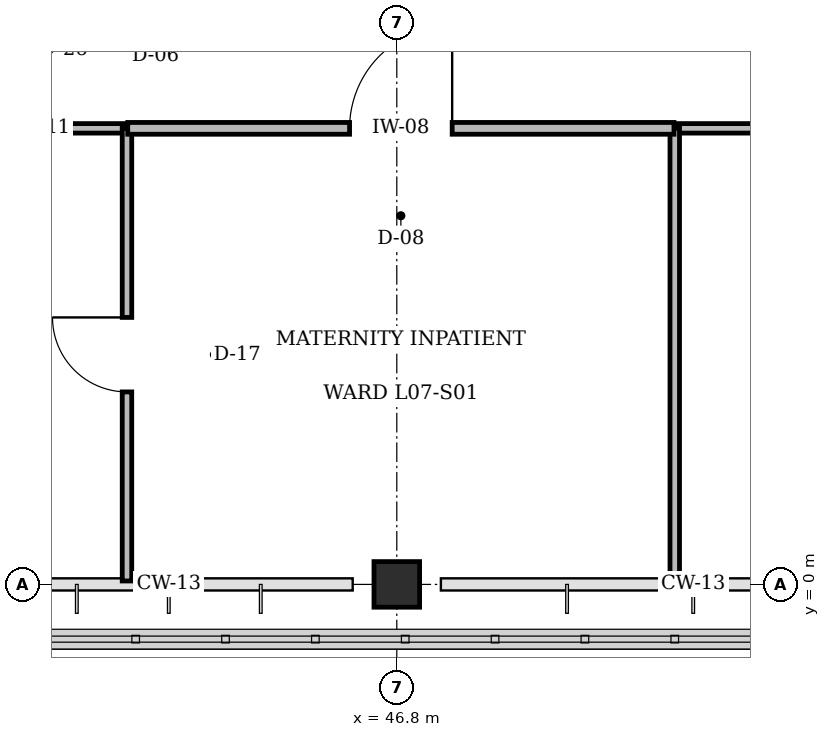
"""IFC4 building model, lengths in metres.
Left out: names, types, materials, properties, quantities, classifications, styles, units other than length and angle.
Written with IfcOpenShell. Run it as: python <this file> out.ifc"""

import sys

from ifc_helpers import new_model, si_unit, direction, frame, frame_2d, origin, origin_2d, place, context, subcontext, project, spatial, rectangle, extrude, element, fill, save


model = new_model("IFC4")
c1 = context("Model", 3, precision=1e-05, world=origin(), true_north=direction((0.0, 1.0)))
c2 = subcontext(c1, "Body", "Model", "MODEL_VIEW")
j1 = project(units=[si_unit("LENGTHUNIT", "METRE"), si_unit("PLANEANGLEUNIT", "RADIAN")], contexts=[c1])
p1 = place(None, origin())
s1 = spatial("IfcSite", under=j1, at=p1, CompositionType="ELEMENT")
p2 = place(p1, origin())
s2 = spatial("IfcBuilding", under=s1, at=p2, CompositionType="ELEMENT")
p3 = place(p2, frame((0.0, 0.0, 30.6)))
s3 = spatial("IfcBuildingStorey", under=s2, at=p3, CompositionType="ELEMENT", Elevation=30.6)
p4 = place(p3, frame((46.8, 0.0, 0.0), z_axis=(0.0, 0.0, 1.0), x_axis=(1.0, 0.0, 0.0)))
e1 = element("IfcColumn", 1, at=p4, inside=s3, PredefinedType="COLUMN", context=c2, shape_type="SweptSolid", body=[
    extrude(rectangle(XDim=0.6, YDim=0.6, at=origin_2d()), origin(), (0.0, 0.0, 1.0), 4.2),
])
p5 = place(p3, frame((41.0, 6.0, 0.0), z_axis=(0.0, 0.0, 1.0), x_axis=(1.0, 0.0, 0.0)))
e2 = element("IfcWall", 2, at=p5, inside=s3, PredefinedType="PARTITIONING", context=c2, shape_type="SweptSolid", body=[
    extrude(rectangle(XDim=2.25, YDim=0.125, at=frame_2d((1.125, 0.0))), origin(), (0.0, 0.0, 1.0), 3.9),
])
p6 = place(p3, frame((43.25, 0.045, 0.0), z_axis=(0.0, 0.0, 1.0), x_axis=(0.0, 1.0, 0.0)))
e3 = element("IfcWall", 3, at=p6, inside=s3, PredefinedType="PARTITIONING", context=c2, shape_type="SweptSolid", body=[
    extrude(rectangle(XDim=5.955, YDim=0.125, at=frame_2d((2.978, 0.0))), origin(), (0.0, 0.0, 1.0), 3.9),
])
p7 = place(p6, frame((2.488, 0.0, 0.0)))
e4 = element("IfcOpeningElement", 4, at=p7, cuts=e3, PredefinedType="OPENING", context=c2, shape_type="SweptSolid", body=[
    extrude(rectangle(XDim=0.98, YDim=2.1, at=frame_2d((0.49, 1.05))), frame((0.0, 0.073, 0.0), z_axis=(0.0, -1.0, 0.0), x_axis=(1.0, 0.0, 0.0)), (0.0, 0.0, 1.0), 0.145),
])
p8 = place(p3, frame((50.457, 6.0, 0.0), z_axis=(0.0, 0.0, 1.0), x_axis=(1.0, 0.0, 0.0)))
e5 = element("IfcWall", 5, at=p8, inside=s3, PredefinedType="PARTITIONING", context=c2, shape_type="SweptSolid", body=[
    extrude(rectangle(XDim=2.25, YDim=0.125, at=frame_2d((1.125, 0.0))), origin(), (0.0, 0.0, 1.0), 3.9),
])
p9 = place(p3, frame((50.457, 0.045, 0.0), z_axis=(0.0, 0.0, 1.0), x_axis=(0.0, 1.0, 0.0)))
e6 = element("IfcWall", 6, at=p9, inside=s3, PredefinedType="PARTITIONING", context=c2, shape_type="SweptSolid", body=[
    extrude(rectangle(XDim=5.955, YDim=0.125, at=frame_2d((2.978, 0.0))), origin(), (0.0, 0.0, 1.0), 3.9),
])
p10 = place(p3, frame((43.26, 6.0, 0.0), z_axis=(0.0, 0.0, 1.0), x_axis=(1.0, 0.0, 0.0)))
e7 = element("IfcWall", 7, at=p10, inside=s3, PredefinedType="PARTITIONING", context=c2, shape_type="SweptSolid", body=[
    extrude(rectangle(XDim=7.187, YDim=0.155, at=frame_2d((3.594, 0.0))), origin(), (0.0, 0.0, 1.0), 3.9),
])
p11 = place(p10, frame((2.918, 0.0, 0.0)))
e8 = element("IfcOpeningElement", 8, at=p11, cuts=e7, PredefinedType="OPENING", context=c2, shape_type="SweptSolid", body=[
    extrude(rectangle(XDim=1.35, YDim=2.2, at=frame_2d((0.675, 1.1))), frame((0.0, 0.087, 0.0), z_axis=(0.0, -1.0, 0.0), x_axis=(1.0, 0.0, 0.0)), (0.0, 0.0, 1.0), 0.175),
])
p12 = place(p7, origin())
e9 = element("IfcDoor", 9, at=p12, inside=s3, OperationType="SINGLE_SWING_RIGHT", PredefinedType="DOOR", context=c2, shape_type="SweptSolid", body=[
    extrude(rectangle(XDim=0.98, YDim=2.1, at=frame_2d((0.49, 1.05))), frame((0.0, 0.025, 0.0), z_axis=(0.0, -1.0, 0.0), x_axis=(1.0, 0.0, 0.0)), (0.0, 0.0, 1.0), 0.05),
])
fill(e4, e9)
p13 = place(p11, origin())
e10 = element("IfcDoor", 10, at=p13, inside=s3, OperationType="SINGLE_SWING_RIGHT", PredefinedType="DOOR", context=c2, shape_type="SweptSolid", body=[
    extrude(rectangle(XDim=1.35, YDim=2.2, at=frame_2d((0.675, 1.1))), frame((0.0, 0.025, 0.0), z_axis=(0.0, -1.0, 0.0), x_axis=(1.0, 0.0, 0.0)), (0.0, 0.0, 1.0), 0.05),
])
fill(e8, e10)
save(model, sys.argv[1])
